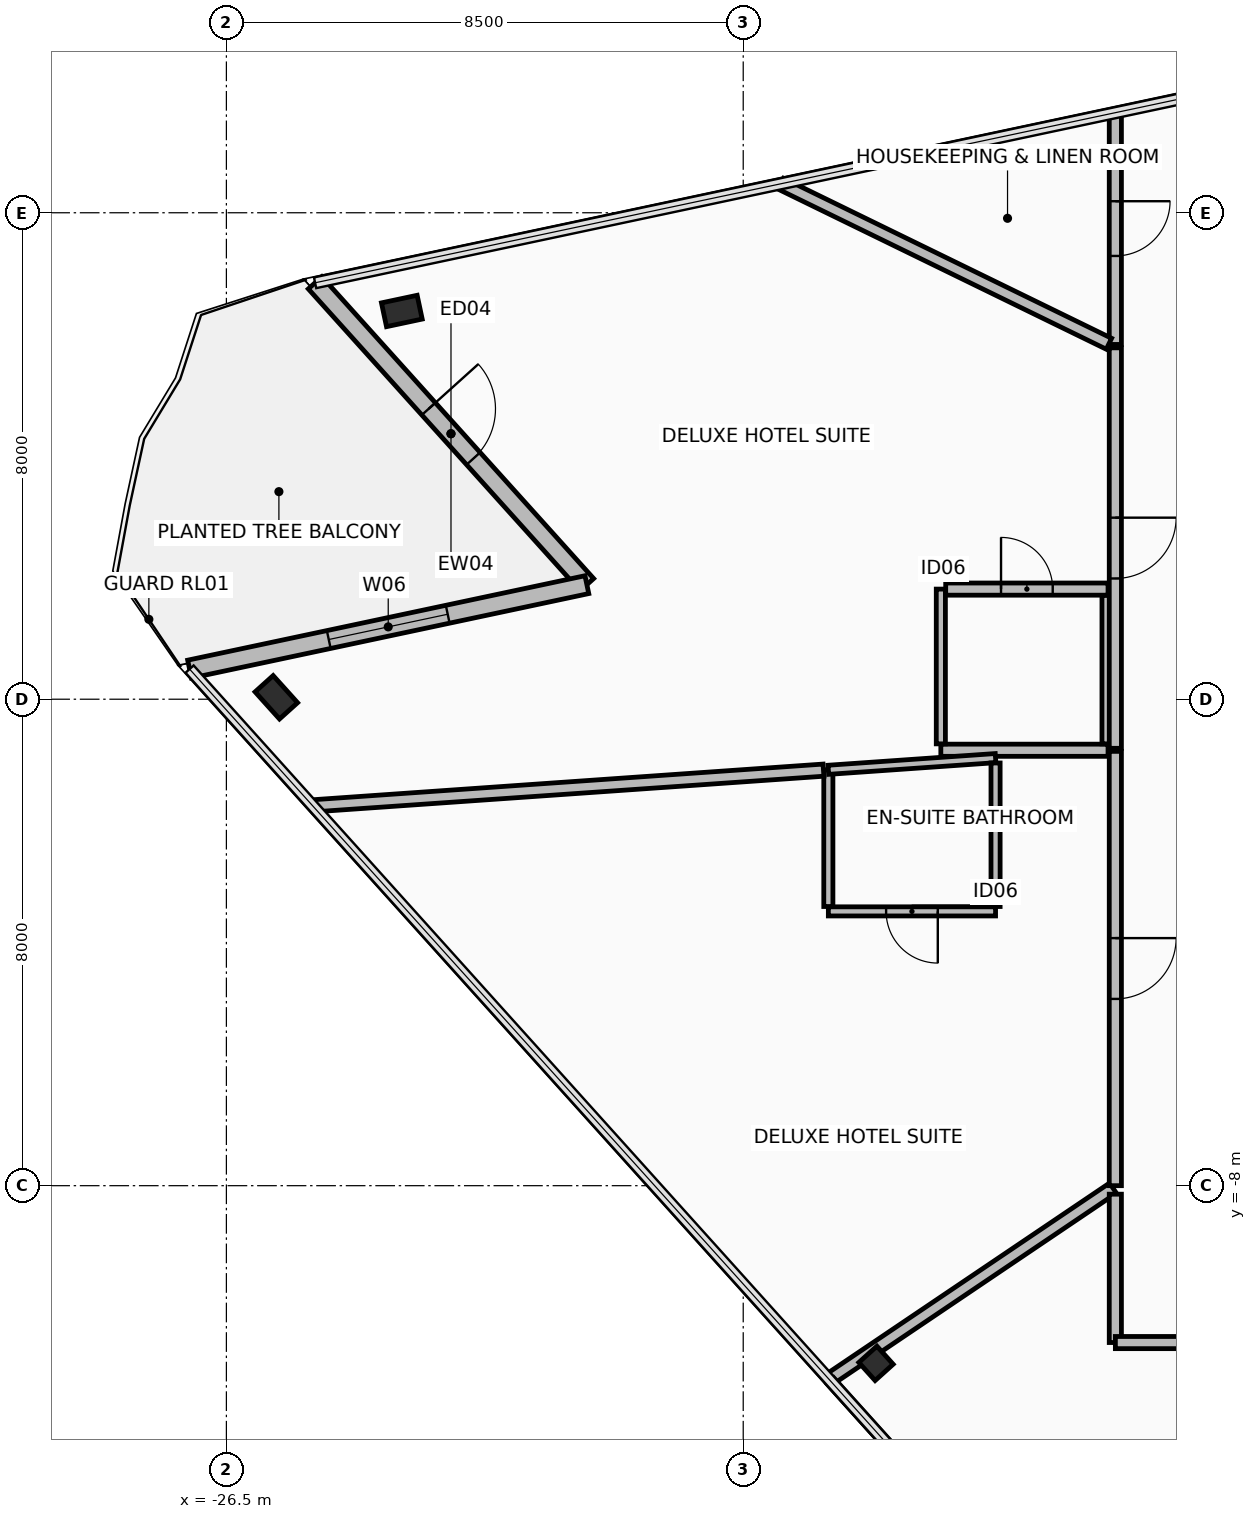
"""IFC4 building model, lengths in metres.
Left out: names, types, materials, properties, quantities, classifications, styles, units other than length and angle.
Written with IfcOpenShell. Run it as: python <this file> out.ifc"""

import sys

from ifc_helpers import new_model, si_unit, direction, frame, frame_2d, origin, origin_2d, place, context, subcontext, project, spatial, rectangle, hollow_rectangle, extrude, element, fill, save


model = new_model("IFC4")
c1 = context("Model", 3, precision=1e-05, world=origin(), true_north=direction((0.0, 1.0)))
c2 = subcontext(c1, "Body", "Model", "MODEL_VIEW")
j1 = project(units=[si_unit("LENGTHUNIT", "METRE"), si_unit("PLANEANGLEUNIT", "RADIAN")], contexts=[c1])
p1 = place(None, origin())
s1 = spatial("IfcSite", under=j1, at=p1, CompositionType="ELEMENT")
p2 = place(p1, origin())
s2 = spatial("IfcBuilding", under=s1, at=p2, CompositionType="ELEMENT")
p3 = place(p2, frame((0.0, 0.0, 279.75)))
s3 = spatial("IfcBuildingStorey", under=s2, at=p3, CompositionType="ELEMENT", Elevation=279.75)
p4 = place(p3, frame((-25.679, 0.032, -0.19), z_axis=(0.0, 0.0, 1.0), x_axis=(-0.669130606359, 0.743144825477, 0.0)))
e1 = element("IfcColumn", 1, at=p4, inside=s3, PredefinedType="COLUMN", context=c2, shape_type="SweptSolid", body=[
    extrude(hollow_rectangle(XDim=0.4, YDim=0.6, WallThickness=0.03, at=origin_2d()), origin(), (0.0, 0.0, 1.0), 3.84),
])
p5 = place(p3, frame((-15.816, -10.922, -0.19), z_axis=(0.0, 0.0, 1.0), x_axis=(-0.669130606359, 0.743144825477, 0.0)))
e2 = element("IfcColumn", 2, at=p5, inside=s3, PredefinedType="COLUMN", context=c2, shape_type="SweptSolid", body=[
    extrude(hollow_rectangle(XDim=0.4, YDim=0.4, WallThickness=0.025, at=origin_2d()), origin(), (0.0, 0.0, 1.0), 3.84),
])
p6 = place(p3, frame((-23.615, 6.385, 0.0), z_axis=(0.0, 0.0, 1.0), x_axis=(0.978147237858, 0.207913398007, 0.0)))
e3 = element("IfcColumn", 3, at=p6, inside=s3, PredefinedType="COLUMN", context=c2, shape_type="SweptSolid", body=[
    extrude(hollow_rectangle(XDim=0.4, YDim=0.6, WallThickness=0.03, at=origin_2d()), origin(), (0.0, 0.0, 1.0), 3.65),
])
p7 = place(p3, frame((-25.041, 6.848, 0.0), z_axis=(0.0, 0.0, 1.0), x_axis=(0.669132313306, -0.743143288532, 0.0)))
e4 = element("IfcWall", 4, at=p7, inside=s3, PredefinedType="STANDARD", context=c2, shape_type="SweptSolid", body=[
    extrude(rectangle(XDim=6.68, YDim=0.3, at=frame_2d((3.34, 0.0))), origin(), (0.0, 0.0, 1.0), 2.81),
])
p8 = place(p7, frame((2.79, 0.0, 0.0)))
e5 = element("IfcOpeningElement", 5, at=p8, cuts=e4, PredefinedType="OPENING", context=c2, shape_type="SweptSolid", body=[
    extrude(rectangle(XDim=1.1, YDim=2.2, at=frame_2d((0.55, 1.1))), frame((0.0, 0.16, 0.0), z_axis=(0.0, -1.0, 0.0), x_axis=(1.0, 0.0, 0.0)), (0.0, 0.0, 1.0), 0.32),
])
p9 = place(p3, frame((-20.571, 1.884, 0.0), z_axis=(0.0, 0.0, 1.0), x_axis=(-0.978145008547, -0.207923885724, 0.0)))
e6 = element("IfcWall", 6, at=p9, inside=s3, PredefinedType="STANDARD", context=c2, shape_type="SweptSolid", body=[
    extrude(rectangle(XDim=6.68, YDim=0.3, at=frame_2d((3.34, 0.0))), origin(), (0.0, 0.0, 1.0), 2.81),
])
p10 = place(p9, frame((2.34, 0.0, 0.25)))
e7 = element("IfcOpeningElement", 7, at=p10, cuts=e6, PredefinedType="OPENING", context=c2, shape_type="SweptSolid", body=[
    extrude(rectangle(XDim=2.0, YDim=2.4, at=frame_2d((1.0, 1.2))), frame((0.0, 0.16, 0.0), z_axis=(0.0, -1.0, 0.0), x_axis=(1.0, 0.0, 0.0)), (0.0, 0.0, 1.0), 0.32),
])
p11 = place(p3, frame((-12.0, -0.839, 0.0), z_axis=(0.0, 0.0, 1.0), x_axis=(-1.0, 0.0, 0.0)))
e8 = element("IfcWall", 8, at=p11, inside=s3, PredefinedType="PARTITIONING", context=c2, shape_type="SweptSolid", body=[
    extrude(rectangle(XDim=2.75, YDim=0.2, at=frame_2d((1.375, 0.0))), origin(), (0.0, 0.0, 1.0), 3.465),
])
p12 = place(p3, frame((-14.75, -0.734, 0.0), z_axis=(0.0, 0.0, 1.0), x_axis=(0.0, 1.0, 0.0)))
e9 = element("IfcWall", 9, at=p12, inside=s3, PredefinedType="PARTITIONING", context=c2, shape_type="SweptSolid", body=[
    extrude(rectangle(XDim=2.545, YDim=0.15, at=frame_2d((1.272, 0.0))), origin(), (0.0, 0.0, 1.0), 3.465),
])
p13 = place(p3, frame((-14.67, 1.811, 0.0), z_axis=(0.0, 0.0, 1.0), x_axis=(1.0, 0.0, 0.0)))
e10 = element("IfcWall", 10, at=p13, inside=s3, PredefinedType="PARTITIONING", context=c2, shape_type="SweptSolid", body=[
    extrude(rectangle(XDim=2.67, YDim=0.2, at=frame_2d((1.335, 0.0))), origin(), (0.0, 0.0, 1.0), 3.465),
])
p14 = place(p13, frame((0.91, 0.0, 0.0)))
e11 = element("IfcOpeningElement", 11, at=p14, cuts=e10, PredefinedType="OPENING", context=c2, shape_type="SweptSolid", body=[
    extrude(rectangle(XDim=0.85, YDim=2.1, at=frame_2d((0.425, 1.05))), frame((0.0, 0.11, 0.0), z_axis=(0.0, -1.0, 0.0), x_axis=(1.0, 0.0, 0.0)), (0.0, 0.0, 1.0), 0.22),
])
p15 = place(p3, frame((-12.0, 1.706, 0.0), z_axis=(0.0, 0.0, 1.0), x_axis=(0.0, -1.0, 0.0)))
e12 = element("IfcWall", 12, at=p15, inside=s3, PredefinedType="PARTITIONING", context=c2, shape_type="SweptSolid", body=[
    extrude(rectangle(XDim=2.44, YDim=0.2, at=frame_2d((1.22, 0.0))), origin(), (0.0, 0.0, 1.0), 3.465),
])
p16 = place(p3, frame((-13.85, -3.489, 0.0), z_axis=(0.0, 0.0, 1.0), x_axis=(-1.0, 0.0, 0.0)))
e13 = element("IfcWall", 13, at=p16, inside=s3, PredefinedType="PARTITIONING", context=c2, shape_type="SweptSolid", body=[
    extrude(rectangle(XDim=2.75, YDim=0.15, at=frame_2d((1.375, 0.0))), origin(), (0.0, 0.0, 1.0), 3.22),
])
p17 = place(p16, frame((0.95, 0.0, 0.0)))
e14 = element("IfcOpeningElement", 14, at=p17, cuts=e13, PredefinedType="OPENING", context=c2, shape_type="SweptSolid", body=[
    extrude(rectangle(XDim=0.85, YDim=2.1, at=frame_2d((0.425, 1.05))), frame((0.0, 0.085, 0.0), z_axis=(0.0, -1.0, 0.0), x_axis=(1.0, 0.0, 0.0)), (0.0, 0.0, 1.0), 0.17),
])
p18 = place(p3, frame((-16.6, -3.409, 0.0), z_axis=(0.0, 0.0, 1.0), x_axis=(0.0, 1.0, 0.0)))
e15 = element("IfcWall", 15, at=p18, inside=s3, PredefinedType="PARTITIONING", context=c2, shape_type="SweptSolid", body=[
    extrude(rectangle(XDim=2.248, YDim=0.15, at=frame_2d((1.124, 0.0))), origin(), (0.0, 0.0, 1.0), 3.465),
])
p19 = place(p3, frame((-16.6, -1.161, 0.0), z_axis=(0.0, 0.0, 1.0), x_axis=(0.997561927417, 0.069786825178, 0.0)))
e16 = element("IfcWall", 16, at=p19, inside=s3, PredefinedType="PARTITIONING", context=c2, shape_type="SweptSolid", body=[
    extrude(rectangle(XDim=2.757, YDim=0.15, at=frame_2d((1.378, 0.0))), origin(), (0.0, 0.0, 1.0), 3.22),
])
p20 = place(p3, frame((-13.85, -1.049, 0.0), z_axis=(0.0, 0.0, 1.0), x_axis=(0.0, -1.0, 0.0)))
e17 = element("IfcWall", 17, at=p20, inside=s3, PredefinedType="PARTITIONING", context=c2, shape_type="SweptSolid", body=[
    extrude(rectangle(XDim=2.361, YDim=0.15, at=frame_2d((1.18, 0.0))), origin(), (0.0, 0.0, 1.0), 3.465),
])
p21 = place(p3, frame((-16.562, -11.171, 0.0), z_axis=(0.0, 0.0, 1.0), x_axis=(0.829047221476, 0.559178598091, 0.0)))
e18 = element("IfcWall", 18, at=p21, inside=s3, PredefinedType="PARTITIONING", context=c2, shape_type="SweptSolid", body=[
    extrude(rectangle(XDim=5.601, YDim=0.2, at=frame_2d((2.8, 0.0))), origin(), (0.0, 0.0, 1.0), 2.81),
])
p22 = place(p3, frame((-11.88, -8.14, 0.0), z_axis=(0.0, 0.0, 1.0), x_axis=(0.0, -1.0, 0.0)))
e19 = element("IfcWall", 19, at=p22, inside=s3, PredefinedType="PARTITIONING", context=c2, shape_type="SweptSolid", body=[
    extrude(rectangle(XDim=2.439, YDim=0.2, at=frame_2d((1.22, 0.0))), origin(), (0.0, 0.0, 1.0), 2.96),
])
p23 = place(p3, frame((-11.879, -10.58, 0.0), z_axis=(0.0, 0.0, 1.0), x_axis=(1.0, 0.0, 0.0)))
e20 = element("IfcWall", 20, at=p23, inside=s3, PredefinedType="PARTITIONING", context=c2, shape_type="SweptSolid", body=[
    extrude(rectangle(XDim=6.679, YDim=0.2, at=frame_2d((3.34, 0.0))), origin(), (0.0, 0.0, 1.0), 3.22),
])
p24 = place(p23, frame((2.915, 0.0, 0.0)))
e21 = element("IfcOpeningElement", 21, at=p24, cuts=e20, PredefinedType="OPENING", context=c2, shape_type="SweptSolid", body=[
    extrude(rectangle(XDim=0.85, YDim=2.1, at=frame_2d((0.425, 1.05))), frame((0.0, 0.11, 0.0), z_axis=(0.0, -1.0, 0.0), x_axis=(1.0, 0.0, 0.0)), (0.0, 0.0, 1.0), 0.22),
])
p25 = place(p3, frame((-9.443, -19.121, 0.0), z_axis=(0.0, 0.0, 1.0), x_axis=(-0.669126879752, 0.743148180912, 0.0)))
e22 = element("IfcWall", 22, at=p25, inside=s3, PredefinedType="PARTITIONING", context=c2, shape_type="SweptSolid", body=[
    extrude(rectangle(XDim=10.647, YDim=0.15, at=frame_2d((5.323, 0.0))), origin(), (0.0, 0.0, 1.0), 3.465),
])
p26 = place(p3, frame((-11.88, 9.646, 0.0), z_axis=(0.0, 0.0, 1.0), x_axis=(0.0, -1.0, 0.0)))
e23 = element("IfcWall", 23, at=p26, inside=s3, PredefinedType="PARTITIONING", context=c2, shape_type="SweptSolid", body=[
    extrude(rectangle(XDim=3.812, YDim=0.2, at=frame_2d((1.906, 0.0))), origin(), (0.0, 0.0, 1.0), 2.81),
])
p27 = place(p26, frame((1.456, 0.0, 0.0)))
e24 = element("IfcOpeningElement", 24, at=p27, cuts=e23, PredefinedType="OPENING", context=c2, shape_type="SweptSolid", body=[
    extrude(rectangle(XDim=0.9, YDim=2.1, at=frame_2d((0.45, 1.05))), frame((0.0, 0.11, 0.0), z_axis=(0.0, -1.0, 0.0), x_axis=(1.0, 0.0, 0.0)), (0.0, 0.0, 1.0), 0.22),
])
p28 = place(p3, frame((-11.985, 5.845, 0.0), z_axis=(0.0, 0.0, 1.0), x_axis=(-0.898777045876, 0.438406001107, 0.0)))
e25 = element("IfcWall", 25, at=p28, inside=s3, PredefinedType="PARTITIONING", context=c2, shape_type="SweptSolid", body=[
    extrude(rectangle(XDim=6.002, YDim=0.2, at=frame_2d((3.001, 0.0))), origin(), (0.0, 0.0, 1.0), 2.81),
])
p29 = place(p3, frame((-11.88, 5.779, 0.0), z_axis=(0.0, 0.0, 1.0), x_axis=(0.0, -1.0, 0.0)))
e26 = element("IfcWall", 26, at=p29, inside=s3, PredefinedType="PARTITIONING", context=c2, shape_type="SweptSolid", body=[
    extrude(rectangle(XDim=6.586, YDim=0.2, at=frame_2d((3.293, 0.0))), origin(), (0.0, 0.0, 1.0), 3.465),
])
p30 = place(p29, frame((2.793, 0.0, 0.0)))
e27 = element("IfcOpeningElement", 27, at=p30, cuts=e26, PredefinedType="OPENING", context=c2, shape_type="SweptSolid", body=[
    extrude(rectangle(XDim=1.0, YDim=2.15, at=frame_2d((0.5, 1.075))), frame((0.0, 0.11, 0.0), z_axis=(0.0, -1.0, 0.0), x_axis=(1.0, 0.0, 0.0)), (0.0, 0.0, 1.0), 0.22),
])
p31 = place(p3, frame((-16.68, -1.167, 0.0), z_axis=(0.0, 0.0, 1.0), x_axis=(-0.997565152075, -0.069740715271, 0.0)))
e28 = element("IfcWall", 28, at=p31, inside=s3, PredefinedType="PARTITIONING", context=c2, shape_type="SweptSolid", body=[
    extrude(rectangle(XDim=8.409, YDim=0.2, at=frame_2d((4.204, 0.0))), origin(), (0.0, 0.0, 1.0), 2.81),
])
p32 = place(p3, frame((-11.88, -0.857, 0.0), z_axis=(0.0, 0.0, 1.0), x_axis=(0.0, -1.0, 0.0)))
e29 = element("IfcWall", 29, at=p32, inside=s3, PredefinedType="PARTITIONING", context=c2, shape_type="SweptSolid", body=[
    extrude(rectangle(XDim=7.143, YDim=0.2, at=frame_2d((3.571, 0.0))), origin(), (0.0, 0.0, 1.0), 3.465),
])
p33 = place(p32, frame((3.071, 0.0, 0.0)))
e30 = element("IfcOpeningElement", 30, at=p33, cuts=e29, PredefinedType="OPENING", context=c2, shape_type="SweptSolid", body=[
    extrude(rectangle(XDim=1.0, YDim=2.15, at=frame_2d((0.5, 1.075))), frame((0.0, 0.11, 0.0), z_axis=(0.0, -1.0, 0.0), x_axis=(1.0, 0.0, 0.0)), (0.0, 0.0, 1.0), 0.22),
])
p34 = place(p8, origin())
e31 = element("IfcDoor", 31, at=p34, inside=s3, OperationType="SINGLE_SWING_LEFT", PredefinedType="DOOR", context=c2, shape_type="SweptSolid", body=[
    extrude(rectangle(XDim=1.1, YDim=2.2, at=frame_2d((0.55, 1.1))), frame((0.0, 0.025, 0.0), z_axis=(0.0, -1.0, 0.0), x_axis=(1.0, 0.0, 0.0)), (0.0, 0.0, 1.0), 0.05),
])
fill(e5, e31)
p35 = place(p10, origin())
e32 = element("IfcWindow", 32, at=p35, inside=s3, PartitioningType="SINGLE_PANEL", PredefinedType="WINDOW", context=c2, shape_type="SweptSolid", body=[
    extrude(rectangle(XDim=2.0, YDim=2.4, at=frame_2d((1.0, 1.2))), frame((0.0, 0.03, 0.0), z_axis=(0.0, -1.0, 0.0), x_axis=(1.0, 0.0, 0.0)), (0.0, 0.0, 1.0), 0.06),
])
fill(e7, e32)
p36 = place(p14, origin())
e33 = element("IfcDoor", 33, at=p36, inside=s3, OperationType="SINGLE_SWING_RIGHT", PredefinedType="DOOR", context=c2, shape_type="SweptSolid", body=[
    extrude(rectangle(XDim=0.85, YDim=2.1, at=frame_2d((0.425, 1.05))), frame((0.0, 0.025, 0.0), z_axis=(0.0, -1.0, 0.0), x_axis=(1.0, 0.0, 0.0)), (0.0, 0.0, 1.0), 0.05),
])
fill(e11, e33)
p37 = place(p17, origin())
e34 = element("IfcDoor", 34, at=p37, inside=s3, OperationType="SINGLE_SWING_RIGHT", PredefinedType="DOOR", context=c2, shape_type="SweptSolid", body=[
    extrude(rectangle(XDim=0.85, YDim=2.1, at=frame_2d((0.425, 1.05))), frame((0.0, 0.025, 0.0), z_axis=(0.0, -1.0, 0.0), x_axis=(1.0, 0.0, 0.0)), (0.0, 0.0, 1.0), 0.05),
])
fill(e14, e34)
p38 = place(p27, origin())
e35 = element("IfcDoor", 35, at=p38, inside=s3, OperationType="SINGLE_SWING_LEFT", PredefinedType="DOOR", context=c2, shape_type="SweptSolid", body=[
    extrude(rectangle(XDim=0.9, YDim=2.1, at=frame_2d((0.45, 1.05))), frame((0.0, 0.025, 0.0), z_axis=(0.0, -1.0, 0.0), x_axis=(1.0, 0.0, 0.0)), (0.0, 0.0, 1.0), 0.05),
])
fill(e24, e35)
p39 = place(p30, origin())
e36 = element("IfcDoor", 36, at=p39, inside=s3, OperationType="SINGLE_SWING_LEFT", PredefinedType="DOOR", context=c2, shape_type="SweptSolid", body=[
    extrude(rectangle(XDim=1.0, YDim=2.15, at=frame_2d((0.5, 1.075))), frame((0.0, 0.025, 0.0), z_axis=(0.0, -1.0, 0.0), x_axis=(1.0, 0.0, 0.0)), (0.0, 0.0, 1.0), 0.05),
])
fill(e27, e36)
p40 = place(p33, origin())
e37 = element("IfcDoor", 37, at=p40, inside=s3, OperationType="SINGLE_SWING_LEFT", PredefinedType="DOOR", context=c2, shape_type="SweptSolid", body=[
    extrude(rectangle(XDim=1.0, YDim=2.15, at=frame_2d((0.5, 1.075))), frame((0.0, 0.025, 0.0), z_axis=(0.0, -1.0, 0.0), x_axis=(1.0, 0.0, 0.0)), (0.0, 0.0, 1.0), 0.05),
])
fill(e30, e37)
save(model, sys.argv[1])
